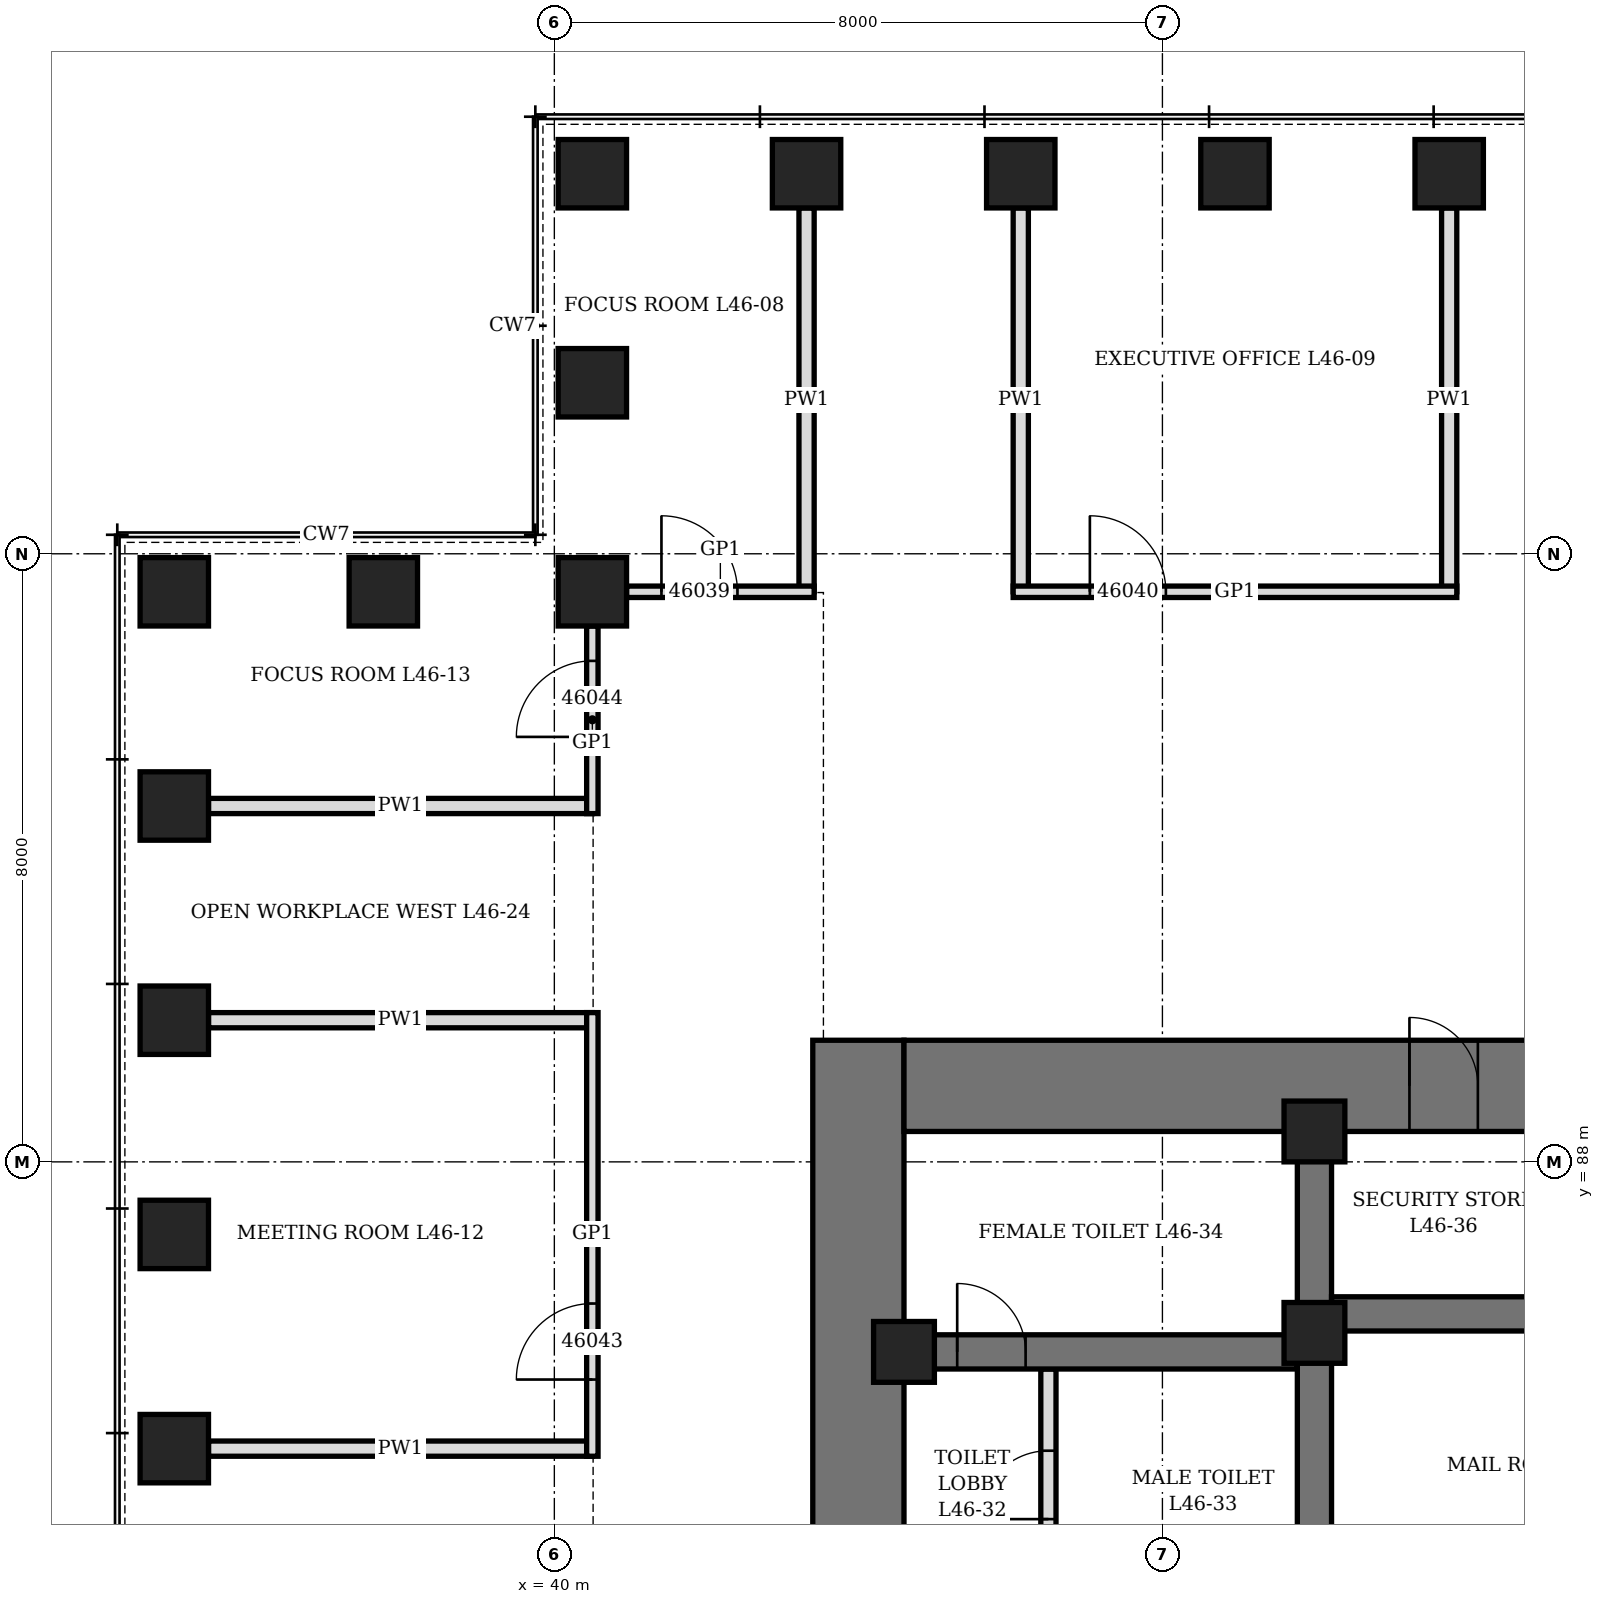
"""IFC4 building model, lengths in metres.
Left out: names, types, materials, properties, quantities, classifications, styles, units other than length and angle.
Written with IfcOpenShell. Run it as: python <this file> out.ifc"""

import sys

from ifc_helpers import new_model, si_unit, direction, frame, frame_2d, origin, origin_2d, place, context, subcontext, project, spatial, rectangle, hollow_rectangle, extrude, element, fill, save


model = new_model("IFC4")
c1 = context("Model", 3, precision=1e-05, world=origin(), true_north=direction((0.0, 1.0)))
c2 = subcontext(c1, "Body", "Model", "MODEL_VIEW")
j1 = project(units=[si_unit("LENGTHUNIT", "METRE"), si_unit("PLANEANGLEUNIT", "RADIAN")], contexts=[c1])
p1 = place(None, origin())
s1 = spatial("IfcSite", under=j1, at=p1, CompositionType="ELEMENT")
p2 = place(p1, origin())
s2 = spatial("IfcBuilding", under=s1, at=p2, CompositionType="ELEMENT")
p3 = place(p2, frame((0.0, 0.0, 206.5)))
s3 = spatial("IfcBuildingStorey", under=s2, at=p3, CompositionType="ELEMENT", Elevation=206.5)
for number, where, z_axis, x_axis in (
    (1, (51.773, 101.0, 0.0), (0.0, 0.0, 1.0), (1.0, 0.0, 0.0)),
    (2, (48.955, 101.0, 0.0), (0.0, 0.0, 1.0), (1.0, 0.0, 0.0)),
    (3, (46.136, 101.0, 0.0), (0.0, 0.0, 1.0), (1.0, 0.0, 0.0)),
    (4, (43.318, 101.0, 0.0), (0.0, 0.0, 1.0), (1.0, 0.0, 0.0)),
    (5, (40.5, 101.0, 0.0), (0.0, 0.0, 1.0), (0.0, 1.0, 0.0)),
    (6, (40.5, 98.25, 0.0), (0.0, 0.0, 1.0), (0.0, 1.0, 0.0)),
    (7, (40.5, 95.5, 0.0), (0.0, 0.0, 1.0), (1.0, 0.0, 0.0)),
    (8, (37.75, 95.5, 0.0), (0.0, 0.0, 1.0), (1.0, 0.0, 0.0)),
    (9, (35.0, 95.5, 0.0), (0.0, 0.0, 1.0), (0.0, 1.0, 0.0)),
    (10, (35.0, 92.682, 0.0), (0.0, 0.0, 1.0), (0.0, 1.0, 0.0)),
    (11, (35.0, 89.864, 0.0), (0.0, 0.0, 1.0), (0.0, 1.0, 0.0)),
    (12, (35.0, 87.045, 0.0), (0.0, 0.0, 1.0), (0.0, 1.0, 0.0)),
    (13, (35.0, 84.227, 0.0), (0.0, 0.0, 1.0), (0.0, 1.0, 0.0)),
):
    element("IfcColumn", number, at=place(p3, frame(where, z_axis=z_axis, x_axis=x_axis)), inside=s3, PredefinedType="COLUMN", context=c2, shape_type="SweptSolid", body=[
        extrude(hollow_rectangle(XDim=0.9, YDim=0.9, WallThickness=0.12, at=origin_2d()), origin(), (0.0, 0.0, 1.0), 4.2),
    ])
p4 = place(p3, frame((44.0, 70.4, 0.0), z_axis=(0.0, 0.0, 1.0), x_axis=(0.0, 1.0, 0.0)))
e14 = element("IfcWall", 14, at=p4, inside=s3, PredefinedType="SHEAR", context=c2, shape_type="SweptSolid", body=[
    extrude(rectangle(XDim=19.2, YDim=1.2, at=frame_2d((9.6, 0.0))), origin(), (0.0, 0.0, 1.0), 4.2),
])
p5 = place(p4, frame((8.6, 0.0, 0.0)))
e15 = element("IfcOpeningElement", 15, at=p5, cuts=e14, PredefinedType="OPENING", context=c2, shape_type="SweptSolid", body=[
    extrude(rectangle(XDim=2.0, YDim=2.4, at=frame_2d((1.0, 1.2))), frame((0.0, 0.61, 0.0), z_axis=(0.0, -1.0, 0.0), x_axis=(1.0, 0.0, 0.0)), (0.0, 0.0, 1.0), 1.22),
])
p6 = place(p3, frame((44.6, 89.0, 0.0), z_axis=(0.0, 0.0, 1.0), x_axis=(1.0, 0.0, 0.0)))
e16 = element("IfcWall", 16, at=p6, inside=s3, PredefinedType="SHEAR", context=c2, shape_type="SweptSolid", body=[
    extrude(rectangle(XDim=22.8, YDim=1.2, at=frame_2d((11.4, 0.0))), origin(), (0.0, 0.0, 1.0), 4.2),
])
p7 = place(p6, frame((9.475, 0.0, 0.0)))
e17 = element("IfcOpeningElement", 17, at=p7, cuts=e16, PredefinedType="OPENING", context=c2, shape_type="SweptSolid", body=[
    extrude(rectangle(XDim=1.0, YDim=2.1, at=frame_2d((0.5, 1.05))), frame((0.0, 0.61, 0.0), z_axis=(0.0, -1.0, 0.0), x_axis=(1.0, 0.0, 0.0)), (0.0, 0.0, 1.0), 1.22),
])
p8 = place(p6, frame((6.65, 0.0, 0.0)))
e18 = element("IfcOpeningElement", 18, at=p8, cuts=e16, PredefinedType="OPENING", context=c2, shape_type="SweptSolid", body=[
    extrude(rectangle(XDim=0.9, YDim=2.1, at=frame_2d((0.45, 1.05))), frame((0.0, 0.61, 0.0), z_axis=(0.0, -1.0, 0.0), x_axis=(1.0, 0.0, 0.0)), (0.0, 0.0, 1.0), 1.22),
])
p9 = place(p6, frame((13.012, 0.0, 0.0)))
e19 = element("IfcOpeningElement", 19, at=p9, cuts=e16, PredefinedType="OPENING", context=c2, shape_type="SweptSolid", body=[
    extrude(rectangle(XDim=0.9, YDim=2.1, at=frame_2d((0.45, 1.05))), frame((0.0, 0.61, 0.0), z_axis=(0.0, -1.0, 0.0), x_axis=(1.0, 0.0, 0.0)), (0.0, 0.0, 1.0), 1.22),
])
p10 = place(p3, frame((50.0, 71.6, 0.0), z_axis=(0.0, 0.0, 1.0), x_axis=(0.0, 1.0, 0.0)))
e20 = element("IfcWall", 20, at=p10, inside=s3, PredefinedType="SHEAR", context=c2, shape_type="SweptSolid", body=[
    extrude(rectangle(XDim=16.8, YDim=0.45, at=frame_2d((8.4, 0.0))), origin(), (0.0, 0.0, 1.0), 4.2),
])
p11 = place(p10, frame((7.5, 0.0, 0.0)))
e21 = element("IfcOpeningElement", 21, at=p11, cuts=e20, PredefinedType="OPENING", context=c2, shape_type="SweptSolid", body=[
    extrude(rectangle(XDim=1.8, YDim=2.4, at=frame_2d((0.9, 1.2))), frame((0.0, 0.235, 0.0), z_axis=(0.0, -1.0, 0.0), x_axis=(1.0, 0.0, 0.0)), (0.0, 0.0, 1.0), 0.47),
])
p12 = place(p3, frame((44.6, 85.5, 0.0), z_axis=(0.0, 0.0, 1.0), x_axis=(1.0, 0.0, 0.0)))
e22 = element("IfcWall", 22, at=p12, inside=s3, PredefinedType="SHEAR", context=c2, shape_type="SweptSolid", body=[
    extrude(rectangle(XDim=5.175, YDim=0.45, at=frame_2d((2.587, 0.0))), origin(), (0.0, 0.0, 1.0), 4.2),
])
p13 = place(p12, frame((0.7, 0.0, 0.0)))
e23 = element("IfcOpeningElement", 23, at=p13, cuts=e22, PredefinedType="OPENING", context=c2, shape_type="SweptSolid", body=[
    extrude(rectangle(XDim=0.9, YDim=2.1, at=frame_2d((0.45, 1.05))), frame((0.0, 0.235, 0.0), z_axis=(0.0, -1.0, 0.0), x_axis=(1.0, 0.0, 0.0)), (0.0, 0.0, 1.0), 0.47),
])
p14 = place(p3, frame((50.225, 86.0, 0.0), z_axis=(0.0, 0.0, 1.0), x_axis=(1.0, 0.0, 0.0)))
e24 = element("IfcWall", 24, at=p14, inside=s3, PredefinedType="SHEAR", context=c2, shape_type="SweptSolid", body=[
    extrude(rectangle(XDim=11.55, YDim=0.45, at=frame_2d((5.775, 0.0))), origin(), (0.0, 0.0, 1.0), 4.2),
])
for number, where, z_axis, x_axis in (
    (25, (44.6, 85.5, 0.0), (0.0, 0.0, 1.0), (1.0, 0.0, 0.0)),
    (26, (50.0, 85.75, 0.0), (0.0, 0.0, 1.0), (1.0, 0.0, 0.0)),
    (27, (50.0, 88.4, 0.0), (0.0, 0.0, 1.0), (1.0, 0.0, 0.0)),
):
    element("IfcColumn", number, at=place(p3, frame(where, z_axis=z_axis, x_axis=x_axis)), inside=s3, PredefinedType="COLUMN", context=c2, shape_type="SweptSolid", body=[
        extrude(hollow_rectangle(XDim=0.8, YDim=0.8, WallThickness=0.1, at=origin_2d()), origin(), (0.0, 0.0, 1.0), 4.2),
    ])
p15 = place(p3, frame((46.5, 82.225, 0.0), z_axis=(0.0, 0.0, 1.0), x_axis=(0.0, 1.0, 0.0)))
e28 = element("IfcWall", 28, at=p15, inside=s3, PredefinedType="PARTITIONING", context=c2, shape_type="SweptSolid", body=[
    extrude(rectangle(XDim=3.05, YDim=0.2, at=frame_2d((1.525, 0.0))), origin(), (0.0, 0.0, 1.0), 4.04),
])
p16 = place(p15, frame((1.075, 0.0, 0.0)))
e29 = element("IfcOpeningElement", 29, at=p16, cuts=e28, PredefinedType="OPENING", context=c2, shape_type="SweptSolid", body=[
    extrude(rectangle(XDim=0.9, YDim=2.1, at=frame_2d((0.45, 1.05))), frame((0.0, 0.11, 0.0), z_axis=(0.0, -1.0, 0.0), x_axis=(1.0, 0.0, 0.0)), (0.0, 0.0, 1.0), 0.22),
])
for number, where, z_axis, x_axis in (
    (30, (43.318, 95.5, 0.0), (0.0, 0.0, 1.0), (0.0, 1.0, 0.0)),
    (31, (46.136, 95.5, 0.0), (0.0, 0.0, 1.0), (0.0, 1.0, 0.0)),
    (32, (51.773, 95.5, 0.0), (0.0, 0.0, 1.0), (0.0, 1.0, 0.0)),
    (33, (35.45, 84.227, 0.0), (0.0, 0.0, 1.0), (1.0, 0.0, 0.0)),
    (34, (35.45, 89.864, 0.0), (0.0, 0.0, 1.0), (1.0, 0.0, 0.0)),
    (35, (35.45, 92.682, 0.0), (0.0, 0.0, 1.0), (1.0, 0.0, 0.0)),
):
    element("IfcWall", number, at=place(p3, frame(where, z_axis=z_axis, x_axis=x_axis)), inside=s3, PredefinedType="PARTITIONING", context=c2, shape_type="SweptSolid", body=[
        extrude(rectangle(XDim=5.05, YDim=0.2, at=frame_2d((2.525, 0.0))), origin(), (0.0, 0.0, 1.0), 3.428),
    ])
p17 = place(p3, frame((40.95, 95.5, 0.0), z_axis=(0.0, 0.0, 1.0), x_axis=(1.0, 0.0, 0.0)))
e36 = element("IfcWall", 36, at=p17, inside=s3, PredefinedType="PARTITIONING", context=c2, shape_type="SweptSolid", body=[
    extrude(rectangle(XDim=2.468, YDim=0.15, at=frame_2d((1.234, 0.0))), origin(), (0.0, 0.0, 1.0), 4.04),
])
p18 = place(p17, frame((0.459, 0.0, 0.0)))
e37 = element("IfcOpeningElement", 37, at=p18, cuts=e36, PredefinedType="OPENING", context=c2, shape_type="SweptSolid", body=[
    extrude(rectangle(XDim=1.0, YDim=2.4, at=frame_2d((0.5, 1.2))), frame((0.0, 0.085, 0.0), z_axis=(0.0, -1.0, 0.0), x_axis=(1.0, 0.0, 0.0)), (0.0, 0.0, 1.0), 0.17),
])
p19 = place(p3, frame((46.036, 95.5, 0.0), z_axis=(0.0, 0.0, 1.0), x_axis=(1.0, 0.0, 0.0)))
e38 = element("IfcWall", 38, at=p19, inside=s3, PredefinedType="PARTITIONING", context=c2, shape_type="SweptSolid", body=[
    extrude(rectangle(XDim=5.836, YDim=0.15, at=frame_2d((2.918, 0.0))), origin(), (0.0, 0.0, 1.0), 4.04),
])
p20 = place(p19, frame((1.009, 0.0, 0.0)))
e39 = element("IfcOpeningElement", 39, at=p20, cuts=e38, PredefinedType="OPENING", context=c2, shape_type="SweptSolid", body=[
    extrude(rectangle(XDim=1.0, YDim=2.1, at=frame_2d((0.5, 1.05))), frame((0.0, 0.085, 0.0), z_axis=(0.0, -1.0, 0.0), x_axis=(1.0, 0.0, 0.0)), (0.0, 0.0, 1.0), 0.17),
])
p21 = place(p3, frame((40.5, 84.127, 0.0), z_axis=(0.0, 0.0, 1.0), x_axis=(0.0, 1.0, 0.0)))
e40 = element("IfcWall", 40, at=p21, inside=s3, PredefinedType="PARTITIONING", context=c2, shape_type="SweptSolid", body=[
    extrude(rectangle(XDim=5.836, YDim=0.15, at=frame_2d((2.918, 0.0))), origin(), (0.0, 0.0, 1.0), 4.04),
])
p22 = place(p21, frame((1.009, 0.0, 0.0)))
e41 = element("IfcOpeningElement", 41, at=p22, cuts=e40, PredefinedType="OPENING", context=c2, shape_type="SweptSolid", body=[
    extrude(rectangle(XDim=1.0, YDim=2.4, at=frame_2d((0.5, 1.2))), frame((0.0, 0.085, 0.0), z_axis=(0.0, -1.0, 0.0), x_axis=(1.0, 0.0, 0.0)), (0.0, 0.0, 1.0), 0.17),
])
p23 = place(p3, frame((40.5, 92.582, 0.0), z_axis=(0.0, 0.0, 1.0), x_axis=(0.0, 1.0, 0.0)))
e42 = element("IfcWall", 42, at=p23, inside=s3, PredefinedType="PARTITIONING", context=c2, shape_type="SweptSolid", body=[
    extrude(rectangle(XDim=2.468, YDim=0.15, at=frame_2d((1.234, 0.0))), origin(), (0.0, 0.0, 1.0), 4.04),
])
p24 = place(p23, frame((1.009, 0.0, 0.0)))
e43 = element("IfcOpeningElement", 43, at=p24, cuts=e42, PredefinedType="OPENING", context=c2, shape_type="SweptSolid", body=[
    extrude(rectangle(XDim=1.0, YDim=2.4, at=frame_2d((0.5, 1.2))), frame((0.0, 0.085, 0.0), z_axis=(0.0, -1.0, 0.0), x_axis=(1.0, 0.0, 0.0)), (0.0, 0.0, 1.0), 0.17),
])
p25 = place(p16, origin())
e44 = element("IfcDoor", 44, at=p25, inside=s3, OperationType="SINGLE_SWING_RIGHT", PredefinedType="DOOR", context=c2, shape_type="SweptSolid", body=[
    extrude(rectangle(XDim=0.9, YDim=2.1, at=frame_2d((0.45, 1.05))), frame((0.0, 0.1, 0.0), z_axis=(0.0, -1.0, 0.0), x_axis=(1.0, 0.0, 0.0)), (0.0, 0.0, 1.0), 0.199),
])
fill(e29, e44)
p26 = place(p13, origin())
e45 = element("IfcDoor", 45, at=p26, inside=s3, OperationType="SINGLE_SWING_RIGHT", PredefinedType="DOOR", context=c2, shape_type="SweptSolid", body=[
    extrude(rectangle(XDim=0.9, YDim=2.1, at=frame_2d((0.45, 1.05))), frame((0.0, 0.225, 0.0), z_axis=(0.0, -1.0, 0.0), x_axis=(1.0, 0.0, 0.0)), (0.0, 0.0, 1.0), 0.449),
])
fill(e23, e45)
p27 = place(p8, origin())
e46 = element("IfcDoor", 46, at=p27, inside=s3, OperationType="SINGLE_SWING_LEFT", PredefinedType="DOOR", context=c2, shape_type="SweptSolid", body=[
    extrude(rectangle(XDim=0.9, YDim=2.1, at=frame_2d((0.45, 1.05))), frame((0.0, 0.35, 0.0), z_axis=(0.0, -1.0, 0.0), x_axis=(1.0, 0.0, 0.0)), (0.0, 0.0, 1.0), 0.7),
])
fill(e18, e46)
p28 = place(p18, origin())
e47 = element("IfcDoor", 47, at=p28, inside=s3, OperationType="SINGLE_SWING_RIGHT", PredefinedType="DOOR", context=c2, shape_type="SweptSolid", body=[
    extrude(rectangle(XDim=1.0, YDim=2.4, at=frame_2d((0.5, 1.2))), frame((0.0, 0.075, 0.0), z_axis=(0.0, -1.0, 0.0), x_axis=(1.0, 0.0, 0.0)), (0.0, 0.0, 1.0), 0.149),
])
fill(e37, e47)
p29 = place(p20, origin())
e48 = element("IfcDoor", 48, at=p29, inside=s3, OperationType="SINGLE_SWING_LEFT", PredefinedType="DOOR", context=c2, shape_type="SweptSolid", body=[
    extrude(rectangle(XDim=1.0, YDim=2.1, at=frame_2d((0.5, 1.05))), frame((0.0, 0.075, 0.0), z_axis=(0.0, -1.0, 0.0), x_axis=(1.0, 0.0, 0.0)), (0.0, 0.0, 1.0), 0.149),
])
fill(e39, e48)
p30 = place(p22, origin())
e49 = element("IfcDoor", 49, at=p30, inside=s3, OperationType="SINGLE_SWING_RIGHT", PredefinedType="DOOR", context=c2, shape_type="SweptSolid", body=[
    extrude(rectangle(XDim=1.0, YDim=2.4, at=frame_2d((0.5, 1.2))), frame((0.0, 0.075, 0.0), z_axis=(0.0, -1.0, 0.0), x_axis=(1.0, 0.0, 0.0)), (0.0, 0.0, 1.0), 0.149),
])
fill(e41, e49)
p31 = place(p24, origin())
e50 = element("IfcDoor", 50, at=p31, inside=s3, OperationType="SINGLE_SWING_RIGHT", PredefinedType="DOOR", context=c2, shape_type="SweptSolid", body=[
    extrude(rectangle(XDim=1.0, YDim=2.4, at=frame_2d((0.5, 1.2))), frame((0.0, 0.075, 0.0), z_axis=(0.0, -1.0, 0.0), x_axis=(1.0, 0.0, 0.0)), (0.0, 0.0, 1.0), 0.149),
])
fill(e43, e50)
save(model, sys.argv[1])
